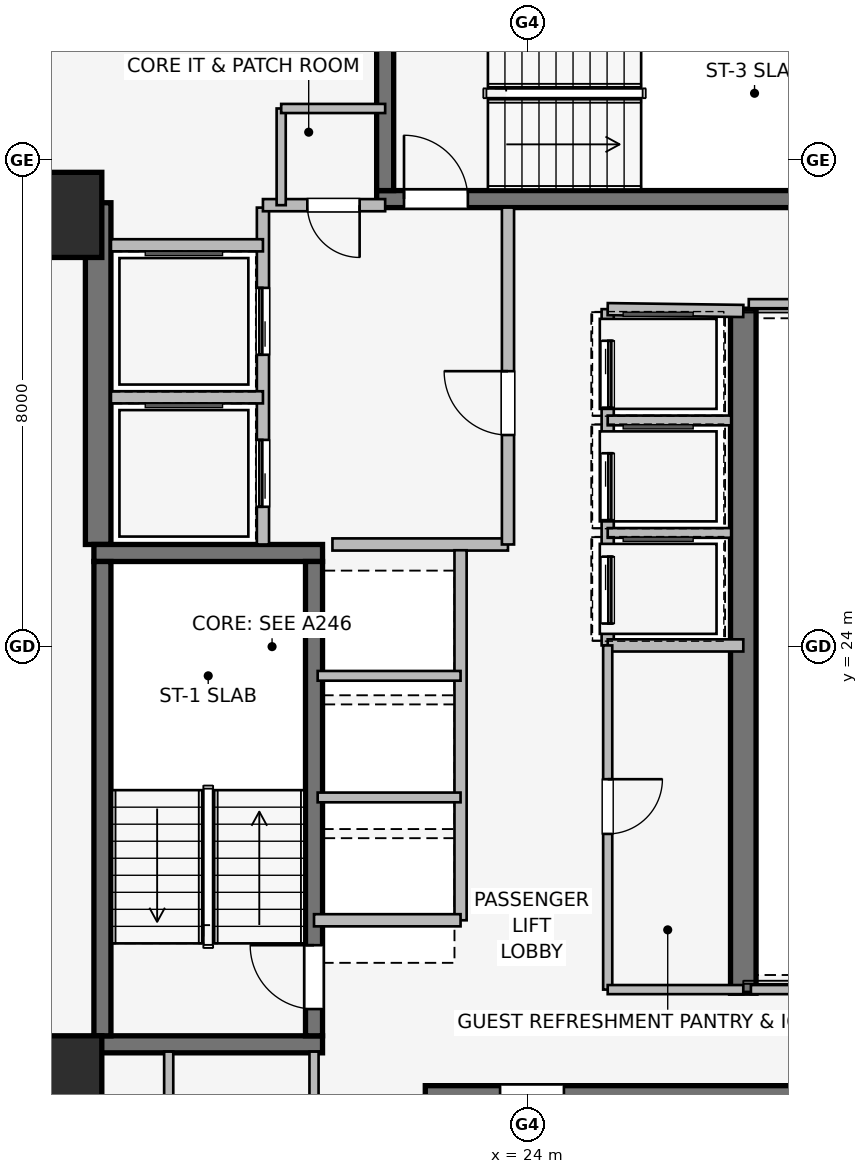
"""IFC4 building model, lengths in metres.
Left out: names, types, materials, properties, quantities, classifications, styles, units other than length and angle.
Written with IfcOpenShell. Run it as: python <this file> out.ifc"""

import sys

from ifc_helpers import new_model, si_unit, direction, frame, frame_2d, origin, origin_2d, place, context, subcontext, project, spatial, rectangle, extrude, element, fill, save


model = new_model("IFC4")
c1 = context("Model", 3, precision=1e-05, world=origin(), true_north=direction((0.0, 1.0)))
c2 = subcontext(c1, "Body", "Model", "MODEL_VIEW")
j1 = project(units=[si_unit("LENGTHUNIT", "METRE"), si_unit("PLANEANGLEUNIT", "RADIAN")], contexts=[c1])
p1 = place(None, origin())
s1 = spatial("IfcSite", under=j1, at=p1, CompositionType="ELEMENT")
p2 = place(p1, origin())
s2 = spatial("IfcBuilding", under=s1, at=p2, CompositionType="ELEMENT")
p3 = place(p2, frame((0.0, 0.0, 163.65)))
s3 = spatial("IfcBuildingStorey", under=s2, at=p3, CompositionType="ELEMENT", Elevation=163.65)
p4 = place(p3, frame((16.94, 25.68, 0.0), z_axis=(0.0, 0.0, 1.0), x_axis=(0.0, 1.0, 0.0)))
e1 = element("IfcWall", 1, at=p4, inside=s3, PredefinedType="SHEAR", context=c2, shape_type="SweptSolid", body=[
    extrude(rectangle(XDim=5.62, YDim=0.42, at=frame_2d((2.81, 0.0))), origin(), (0.0, 0.0, 1.0), 3.45),
])
p5 = place(p3, frame((27.55, 29.55, 0.0), z_axis=(0.0, 0.0, 1.0), x_axis=(0.0, -1.0, 0.0)))
e2 = element("IfcWall", 2, at=p5, inside=s3, PredefinedType="SHEAR", context=c2, shape_type="SweptSolid", body=[
    extrude(rectangle(XDim=11.25, YDim=0.42, at=frame_2d((5.625, 0.0))), origin(), (0.0, 0.0, 1.0), 3.45),
])
for number, where, z_axis, x_axis in (
    (3, (16.87, 17.46, 0.0), (0.0, 0.0, 1.0), (1.0, 0.0, 0.0)),
    (4, (20.63, 25.54, 0.0), (0.0, 0.0, 1.0), (-1.0, 0.0, 0.0)),
):
    element("IfcWall", number, at=place(p3, frame(where, z_axis=z_axis, x_axis=x_axis)), inside=s3, PredefinedType="SHEAR", context=c2, shape_type="SweptSolid", body=[
        extrude(rectangle(XDim=3.76, YDim=0.28, at=frame_2d((1.88, 0.0))), origin(), (0.0, 0.0, 1.0), 3.45),
    ])
p6 = place(p3, frame((17.01, 25.4, 0.0), z_axis=(0.0, 0.0, 1.0), x_axis=(0.0, -1.0, 0.0)))
e5 = element("IfcWall", 5, at=p6, inside=s3, PredefinedType="SHEAR", context=c2, shape_type="SweptSolid", body=[
    extrude(rectangle(XDim=7.8, YDim=0.28, at=frame_2d((3.9, 0.0))), origin(), (0.0, 0.0, 1.0), 3.45),
])
p7 = place(p3, frame((20.49, 17.6, 0.0), z_axis=(0.0, 0.0, 1.0), x_axis=(0.0, 1.0, 0.0)))
e6 = element("IfcWall", 6, at=p7, inside=s3, PredefinedType="SHEAR", context=c2, shape_type="SweptSolid", body=[
    extrude(rectangle(XDim=7.8, YDim=0.28, at=frame_2d((3.9, 0.0))), origin(), (0.0, 0.0, 1.0), 3.45),
])
p8 = place(p7, frame((0.44, 0.0, 0.0)))
e7 = element("IfcOpeningElement", 7, at=p8, cuts=e6, PredefinedType="OPENING", context=c2, shape_type="SweptSolid", body=[
    extrude(rectangle(XDim=1.05, YDim=2.0, at=frame_2d((0.525, 1.0))), frame((0.0, 0.15, 0.0), z_axis=(0.0, -1.0, 0.0), x_axis=(1.0, 0.0, 0.0)), (0.0, 0.0, 1.0), 0.3),
])
p9 = place(p3, frame((30.68, 16.64, 0.0), z_axis=(0.0, 0.0, 1.0), x_axis=(-1.0, 0.0, 0.0)))
e8 = element("IfcWall", 8, at=p9, inside=s3, PredefinedType="SHEAR", context=c2, shape_type="SweptSolid", body=[
    extrude(rectangle(XDim=8.36, YDim=0.28, at=frame_2d((4.18, 0.0))), origin(), (0.0, 0.0, 1.0), 3.45),
])
p10 = place(p9, frame((6.08, 0.0, 0.0)))
e9 = element("IfcOpeningElement", 9, at=p10, cuts=e8, PredefinedType="OPENING", context=c2, shape_type="SweptSolid", body=[
    extrude(rectangle(XDim=1.05, YDim=2.0, at=frame_2d((0.525, 1.0))), frame((0.0, 0.15, 0.0), z_axis=(0.0, -1.0, 0.0), x_axis=(1.0, 0.0, 0.0)), (0.0, 0.0, 1.0), 0.3),
])
p11 = place(p3, frame((21.52, 31.36, 0.0), z_axis=(0.0, 0.0, 1.0), x_axis=(1.0, 0.0, 0.0)))
e10 = element("IfcWall", 10, at=p11, inside=s3, PredefinedType="SHEAR", context=c2, shape_type="SweptSolid", body=[
    extrude(rectangle(XDim=8.36, YDim=0.28, at=frame_2d((4.18, 0.0))), origin(), (0.0, 0.0, 1.0), 3.45),
])
p12 = place(p11, frame((0.45, 0.0, 0.0)))
e11 = element("IfcOpeningElement", 11, at=p12, cuts=e10, PredefinedType="OPENING", context=c2, shape_type="SweptSolid", body=[
    extrude(rectangle(XDim=1.05, YDim=2.0, at=frame_2d((0.525, 1.0))), frame((0.0, 0.15, 0.0), z_axis=(0.0, -1.0, 0.0), x_axis=(1.0, 0.0, 0.0)), (0.0, 0.0, 1.0), 0.3),
])
p13 = place(p3, frame((21.66, 34.7, 0.0), z_axis=(0.0, 0.0, 1.0), x_axis=(0.0, -1.0, 0.0)))
e12 = element("IfcWall", 12, at=p13, inside=s3, PredefinedType="SHEAR", context=c2, shape_type="SweptSolid", body=[
    extrude(rectangle(XDim=3.2, YDim=0.28, at=frame_2d((1.6, 0.0))), origin(), (0.0, 0.0, 1.0), 3.45),
])
for number, where, z_axis, x_axis in (
    (13, (16.3, 16.9, 0.0), (0.0, 0.0, 1.0), (1.0, 0.0, 0.0)),
    (14, (16.3, 31.1, 0.0), (0.0, 0.0, 1.0), (1.0, 0.0, 0.0)),
):
    element("IfcColumn", number, at=place(p3, frame(where, z_axis=z_axis, x_axis=x_axis)), inside=s3, PredefinedType="COLUMN", context=c2, shape_type="SweptSolid", body=[
        extrude(rectangle(XDim=1.4, YDim=1.4, at=origin_2d()), origin(), (0.0, 0.0, 1.0), 3.45),
    ])
p14 = place(p3, frame((15.415, 32.882, 0.0), z_axis=(0.0, 0.0, 1.0), x_axis=(0.520325409202, 0.853968072318, 0.0)))
e15 = element("IfcWall", 15, at=p14, inside=s3, PredefinedType="STANDARD", context=c2, shape_type="SweptSolid", body=[
    extrude(rectangle(XDim=1.678, YDim=0.33, at=frame_2d((0.839, 0.0))), origin(), (0.0, 0.0, 1.0), 3.19),
])
p15 = place(p3, frame((19.65, 25.68, 0.0), z_axis=(0.0, 0.0, 1.0), x_axis=(0.0, 1.0, 0.0)))
e16 = element("IfcWall", 16, at=p15, inside=s3, PredefinedType="PARTITIONING", context=c2, shape_type="SweptSolid", body=[
    extrude(rectangle(XDim=5.54, YDim=0.2, at=frame_2d((2.77, 0.0))), origin(), (0.0, 0.0, 1.0), 3.19),
])
p16 = place(p15, frame((0.62, 0.0, 0.0)))
e17 = element("IfcOpeningElement", 17, at=p16, cuts=e16, PredefinedType="OPENING", context=c2, shape_type="SweptSolid", body=[
    extrude(rectangle(XDim=1.1, YDim=2.2, at=frame_2d((0.55, 1.1))), frame((0.0, 0.11, 0.0), z_axis=(0.0, -1.0, 0.0), x_axis=(1.0, 0.0, 0.0)), (0.0, 0.0, 1.0), 0.22),
])
p17 = place(p15, frame((3.12, 0.0, 0.0)))
e18 = element("IfcOpeningElement", 18, at=p17, cuts=e16, PredefinedType="OPENING", context=c2, shape_type="SweptSolid", body=[
    extrude(rectangle(XDim=1.1, YDim=2.2, at=frame_2d((0.55, 1.1))), frame((0.0, 0.11, 0.0), z_axis=(0.0, -1.0, 0.0), x_axis=(1.0, 0.0, 0.0)), (0.0, 0.0, 1.0), 0.22),
])
p18 = place(p3, frame((20.793, 25.68, 0.0), z_axis=(0.0, 0.0, 1.0), x_axis=(1.0, 0.0, 0.0)))
e19 = element("IfcWall", 19, at=p18, inside=s3, PredefinedType="PARTITIONING", context=c2, shape_type="SweptSolid", body=[
    extrude(rectangle(XDim=2.887, YDim=0.2, at=frame_2d((1.443, 0.0))), origin(), (0.0, 0.0, 1.0), 3.19),
])
p19 = place(p3, frame((23.68, 25.68, 0.0), z_axis=(0.0, 0.0, 1.0), x_axis=(0.0, 1.0, 0.0)))
e20 = element("IfcWall", 20, at=p19, inside=s3, PredefinedType="PARTITIONING", context=c2, shape_type="SweptSolid", body=[
    extrude(rectangle(XDim=5.54, YDim=0.2, at=frame_2d((2.77, 0.0))), origin(), (0.0, 0.0, 1.0), 3.19),
])
p20 = place(p19, frame((1.8, 0.0, 0.0)))
e21 = element("IfcOpeningElement", 21, at=p20, cuts=e20, PredefinedType="OPENING", context=c2, shape_type="SweptSolid", body=[
    extrude(rectangle(XDim=1.05, YDim=2.0, at=frame_2d((0.525, 1.0))), frame((0.0, 0.11, 0.0), z_axis=(0.0, -1.0, 0.0), x_axis=(1.0, 0.0, 0.0)), (0.0, 0.0, 1.0), 0.22),
])
p21 = place(p3, frame((21.66, 31.26, 0.0), z_axis=(0.0, 0.0, 1.0), x_axis=(-1.0, 0.0, 0.0)))
e22 = element("IfcWall", 22, at=p21, inside=s3, PredefinedType="PARTITIONING", context=c2, shape_type="SweptSolid", body=[
    extrude(rectangle(XDim=2.01, YDim=0.2, at=frame_2d((1.005, 0.0))), origin(), (0.0, 0.0, 1.0), 3.19),
])
p22 = place(p21, frame((0.42, 0.0, 0.0)))
e23 = element("IfcOpeningElement", 23, at=p22, cuts=e22, PredefinedType="OPENING", context=c2, shape_type="SweptSolid", body=[
    extrude(rectangle(XDim=0.86, YDim=2.0, at=frame_2d((0.43, 1.0))), frame((0.0, 0.11, 0.0), z_axis=(0.0, -1.0, 0.0), x_axis=(1.0, 0.0, 0.0)), (0.0, 0.0, 1.0), 0.22),
])
p23 = place(p3, frame((17.15, 28.1, 0.0), z_axis=(0.0, 0.0, 1.0), x_axis=(1.0, 0.0, 0.0)))
e24 = element("IfcWall", 24, at=p23, inside=s3, PredefinedType="PARTITIONING", context=c2, shape_type="SweptSolid", body=[
    extrude(rectangle(XDim=2.5, YDim=0.2, at=frame_2d((1.25, 0.0))), origin(), (0.0, 0.0, 1.0), 3.19),
])
p24 = place(p3, frame((19.65, 30.6, 0.0), z_axis=(0.0, 0.0, 1.0), x_axis=(-1.0, 0.0, 0.0)))
e25 = element("IfcWall", 25, at=p24, inside=s3, PredefinedType="PARTITIONING", context=c2, shape_type="SweptSolid", body=[
    extrude(rectangle(XDim=2.5, YDim=0.2, at=frame_2d((1.25, 0.0))), origin(), (0.0, 0.0, 1.0), 2.09),
])
p25 = place(p3, frame((22.9, 19.5, 0.0), z_axis=(0.0, 0.0, 1.0), x_axis=(0.0, 1.0, 0.0)))
e26 = element("IfcWall", 26, at=p25, inside=s3, PredefinedType="PARTITIONING", context=c2, shape_type="SweptSolid", body=[
    extrude(rectangle(XDim=6.085, YDim=0.2, at=frame_2d((3.042, 0.0))), origin(), (0.0, 0.0, 1.0), 3.19),
])
p26 = place(p3, frame((20.49, 19.5, 0.0), z_axis=(0.0, 0.0, 1.0), x_axis=(1.0, 0.0, 0.0)))
e27 = element("IfcWall", 27, at=p26, inside=s3, PredefinedType="PARTITIONING", context=c2, shape_type="SweptSolid", body=[
    extrude(rectangle(XDim=2.41, YDim=0.2, at=frame_2d((1.205, 0.0))), origin(), (0.0, 0.0, 1.0), 2.09),
])
for number, where, z_axis, x_axis in (
    (28, (20.55, 21.52, 0.0), (0.0, 0.0, 1.0), (1.0, 0.0, 0.0)),
    (29, (20.55, 23.52, 0.0), (0.0, 0.0, 1.0), (1.0, 0.0, 0.0)),
):
    element("IfcWall", number, at=place(p3, frame(where, z_axis=z_axis, x_axis=x_axis)), inside=s3, PredefinedType="PARTITIONING", context=c2, shape_type="SweptSolid", body=[
        extrude(rectangle(XDim=2.35, YDim=0.16, at=frame_2d((1.175, 0.0))), origin(), (0.0, 0.0, 1.0), 3.19),
    ])
p27 = place(p3, frame((25.32, 29.55, 0.0), z_axis=(0.0, 0.0, 1.0), x_axis=(0.0, -1.0, 0.0)))
e30 = element("IfcWall", 30, at=p27, inside=s3, PredefinedType="PARTITIONING", context=c2, shape_type="SweptSolid", body=[
    extrude(rectangle(XDim=5.53, YDim=0.2, at=frame_2d((2.765, 0.0))), origin(), (0.0, 0.0, 1.0), 3.19),
])
p28 = place(p27, frame((0.52, 0.0, 0.0)))
e31 = element("IfcOpeningElement", 31, at=p28, cuts=e30, PredefinedType="OPENING", context=c2, shape_type="SweptSolid", body=[
    extrude(rectangle(XDim=1.1, YDim=2.2, at=frame_2d((0.55, 1.1))), frame((0.0, 0.11, 0.0), z_axis=(0.0, -1.0, 0.0), x_axis=(1.0, 0.0, 0.0)), (0.0, 0.0, 1.0), 0.22),
])
p29 = place(p27, frame((2.37, 0.0, 0.0)))
e32 = element("IfcOpeningElement", 32, at=p29, cuts=e30, PredefinedType="OPENING", context=c2, shape_type="SweptSolid", body=[
    extrude(rectangle(XDim=1.1, YDim=2.2, at=frame_2d((0.55, 1.1))), frame((0.0, 0.11, 0.0), z_axis=(0.0, -1.0, 0.0), x_axis=(1.0, 0.0, 0.0)), (0.0, 0.0, 1.0), 0.22),
])
p30 = place(p27, frame((4.07, 0.0, 0.0)))
e33 = element("IfcOpeningElement", 33, at=p30, cuts=e30, PredefinedType="OPENING", context=c2, shape_type="SweptSolid", body=[
    extrude(rectangle(XDim=1.1, YDim=2.2, at=frame_2d((0.55, 1.1))), frame((0.0, 0.11, 0.0), z_axis=(0.0, -1.0, 0.0), x_axis=(1.0, 0.0, 0.0)), (0.0, 0.0, 1.0), 0.22),
])
p31 = place(p3, frame((27.55, 29.52, 0.0), z_axis=(0.0, 0.0, 1.0), x_axis=(-0.999909343457, 0.013464949556, 0.0)))
e34 = element("IfcWall", 34, at=p31, inside=s3, PredefinedType="PARTITIONING", context=c2, shape_type="SweptSolid", body=[
    extrude(rectangle(XDim=2.23, YDim=0.2, at=frame_2d((1.115, 0.0))), origin(), (0.0, 0.0, 1.0), 2.09),
])
p32 = place(p3, frame((25.32, 24.02, 0.0), z_axis=(0.0, 0.0, 1.0), x_axis=(1.0, 0.0, 0.0)))
e35 = element("IfcWall", 35, at=p32, inside=s3, PredefinedType="PARTITIONING", context=c2, shape_type="SweptSolid", body=[
    extrude(rectangle(XDim=2.23, YDim=0.2, at=frame_2d((1.115, 0.0))), origin(), (0.0, 0.0, 1.0), 3.19),
])
for number, where, z_axis, x_axis in (
    (36, (25.32, 25.87, 0.0), (0.0, 0.0, 1.0), (1.0, 0.0, 0.0)),
    (37, (25.32, 27.72, 0.0), (0.0, 0.0, 1.0), (1.0, 0.0, 0.0)),
):
    element("IfcWall", number, at=place(p3, frame(where, z_axis=z_axis, x_axis=x_axis)), inside=s3, PredefinedType="PARTITIONING", context=c2, shape_type="SweptSolid", body=[
        extrude(rectangle(XDim=2.03, YDim=0.16, at=frame_2d((1.015, 0.0))), origin(), (0.0, 0.0, 1.0), 3.19),
    ])
p33 = place(p3, frame((25.32, 24.02, 0.0), z_axis=(0.0, 0.0, 1.0), x_axis=(0.0, -1.0, 0.0)))
e38 = element("IfcWall", 38, at=p33, inside=s3, PredefinedType="PARTITIONING", context=c2, shape_type="SweptSolid", body=[
    extrude(rectangle(XDim=5.66, YDim=0.15, at=frame_2d((2.83, 0.0))), origin(), (0.0, 0.0, 1.0), 3.19),
])
p34 = place(p33, frame((2.2, 0.0, 0.0)))
e39 = element("IfcOpeningElement", 39, at=p34, cuts=e38, PredefinedType="OPENING", context=c2, shape_type="SweptSolid", body=[
    extrude(rectangle(XDim=0.9, YDim=2.0, at=frame_2d((0.45, 1.0))), frame((0.0, 0.085, 0.0), z_axis=(0.0, -1.0, 0.0), x_axis=(1.0, 0.0, 0.0)), (0.0, 0.0, 1.0), 0.17),
])
p35 = place(p3, frame((25.32, 18.36, 0.0), z_axis=(0.0, 0.0, 1.0), x_axis=(1.0, 0.0, 0.0)))
e40 = element("IfcWall", 40, at=p35, inside=s3, PredefinedType="PARTITIONING", context=c2, shape_type="SweptSolid", body=[
    extrude(rectangle(XDim=2.23, YDim=0.15, at=frame_2d((1.115, 0.0))), origin(), (0.0, 0.0, 1.0), 3.19),
])
p36 = place(p3, frame((18.1, 17.34, 0.0), z_axis=(0.0, 0.0, 1.0), x_axis=(0.0, -1.0, 0.0)))
e41 = element("IfcWall", 41, at=p36, inside=s3, PredefinedType="PARTITIONING", context=c2, shape_type="SweptSolid", body=[
    extrude(rectangle(XDim=3.66, YDim=0.15, at=frame_2d((1.83, 0.0))), origin(), (0.0, 0.0, 1.0), 3.19),
])
p37 = place(p3, frame((20.49, 13.68, 0.0), z_axis=(0.0, 0.0, 1.0), x_axis=(0.0, 1.0, 0.0)))
e42 = element("IfcWall", 42, at=p37, inside=s3, PredefinedType="PARTITIONING", context=c2, shape_type="SweptSolid", body=[
    extrude(rectangle(XDim=3.66, YDim=0.15, at=frame_2d((1.83, 0.0))), origin(), (0.0, 0.0, 1.0), 3.19),
])
p38 = place(p37, frame((1.25, 0.0, 0.0)))
e43 = element("IfcOpeningElement", 43, at=p38, cuts=e42, PredefinedType="OPENING", context=c2, shape_type="SweptSolid", body=[
    extrude(rectangle(XDim=0.9, YDim=2.0, at=frame_2d((0.45, 1.0))), frame((0.0, 0.085, 0.0), z_axis=(0.0, -1.0, 0.0), x_axis=(1.0, 0.0, 0.0)), (0.0, 0.0, 1.0), 0.17),
])
p39 = place(p3, frame((19.95, 32.85, 0.0), z_axis=(0.0, 0.0, 1.0), x_axis=(0.0, -1.0, 0.0)))
e44 = element("IfcWall", 44, at=p39, inside=s3, PredefinedType="PARTITIONING", context=c2, shape_type="SweptSolid", body=[
    extrude(rectangle(XDim=1.59, YDim=0.15, at=frame_2d((0.795, 0.0))), origin(), (0.0, 0.0, 1.0), 3.19),
])
p40 = place(p3, frame((21.66, 32.85, 0.0), z_axis=(0.0, 0.0, 1.0), x_axis=(-1.0, 0.0, 0.0)))
e45 = element("IfcWall", 45, at=p40, inside=s3, PredefinedType="PARTITIONING", context=c2, shape_type="SweptSolid", body=[
    extrude(rectangle(XDim=1.71, YDim=0.15, at=frame_2d((0.855, 0.0))), origin(), (0.0, 0.0, 1.0), 3.19),
])
p41 = place(p3, frame((27.675, 18.36, 0.0), z_axis=(0.0, 0.0, 1.0), x_axis=(1.0, 0.0, 0.0)))
e46 = element("IfcWall", 46, at=p41, inside=s3, PredefinedType="PARTITIONING", context=c2, shape_type="SweptSolid", body=[
    extrude(rectangle(XDim=12.165, YDim=0.15, at=frame_2d((6.083, 0.0))), origin(), (0.0, 0.0, 1.0), 2.331),
])
p42 = place(p3, frame((39.84, 29.64, 0.0), z_axis=(0.0, 0.0, 1.0), x_axis=(-1.0, 0.0, 0.0)))
e47 = element("IfcWall", 47, at=p42, inside=s3, PredefinedType="PARTITIONING", context=c2, shape_type="SweptSolid", body=[
    extrude(rectangle(XDim=12.2, YDim=0.15, at=frame_2d((6.1, 0.0))), origin(), (0.0, 0.0, 1.0), 2.331),
])
p43 = place(p8, origin())
e48 = element("IfcDoor", 48, at=p43, inside=s3, OperationType="SINGLE_SWING_RIGHT", PredefinedType="DOOR", context=c2, shape_type="SweptSolid", body=[
    extrude(rectangle(XDim=1.05, YDim=2.0, at=frame_2d((0.525, 1.0))), frame((0.0, 0.025, 0.0), z_axis=(0.0, -1.0, 0.0), x_axis=(1.0, 0.0, 0.0)), (0.0, 0.0, 1.0), 0.05),
])
fill(e7, e48)
p44 = place(p10, origin())
e49 = element("IfcDoor", 49, at=p44, inside=s3, OperationType="SINGLE_SWING_RIGHT", PredefinedType="DOOR", context=c2, shape_type="SweptSolid", body=[
    extrude(rectangle(XDim=1.05, YDim=2.0, at=frame_2d((0.525, 1.0))), frame((0.0, 0.025, 0.0), z_axis=(0.0, -1.0, 0.0), x_axis=(1.0, 0.0, 0.0)), (0.0, 0.0, 1.0), 0.05),
])
fill(e9, e49)
p45 = place(p12, origin())
e50 = element("IfcDoor", 50, at=p45, inside=s3, OperationType="SINGLE_SWING_LEFT", PredefinedType="DOOR", context=c2, shape_type="SweptSolid", body=[
    extrude(rectangle(XDim=1.05, YDim=2.0, at=frame_2d((0.525, 1.0))), frame((0.0, 0.025, 0.0), z_axis=(0.0, -1.0, 0.0), x_axis=(1.0, 0.0, 0.0)), (0.0, 0.0, 1.0), 0.05),
])
fill(e11, e50)
p46 = place(p16, origin())
e51 = element("IfcDoor", 51, at=p46, inside=s3, OperationType="SLIDING_TO_LEFT", PredefinedType="DOOR", context=c2, shape_type="SweptSolid", body=[
    extrude(rectangle(XDim=1.1, YDim=2.2, at=frame_2d((0.55, 1.1))), frame((0.0, 0.025, 0.0), z_axis=(0.0, -1.0, 0.0), x_axis=(1.0, 0.0, 0.0)), (0.0, 0.0, 1.0), 0.05),
])
fill(e17, e51)
p47 = place(p17, origin())
e52 = element("IfcDoor", 52, at=p47, inside=s3, OperationType="SLIDING_TO_LEFT", PredefinedType="DOOR", context=c2, shape_type="SweptSolid", body=[
    extrude(rectangle(XDim=1.1, YDim=2.2, at=frame_2d((0.55, 1.1))), frame((0.0, 0.025, 0.0), z_axis=(0.0, -1.0, 0.0), x_axis=(1.0, 0.0, 0.0)), (0.0, 0.0, 1.0), 0.05),
])
fill(e18, e52)
p48 = place(p20, origin())
e53 = element("IfcDoor", 53, at=p48, inside=s3, OperationType="SINGLE_SWING_RIGHT", PredefinedType="DOOR", context=c2, shape_type="SweptSolid", body=[
    extrude(rectangle(XDim=1.05, YDim=2.0, at=frame_2d((0.525, 1.0))), frame((0.0, 0.025, 0.0), z_axis=(0.0, -1.0, 0.0), x_axis=(1.0, 0.0, 0.0)), (0.0, 0.0, 1.0), 0.05),
])
fill(e21, e53)
p49 = place(p22, origin())
e54 = element("IfcDoor", 54, at=p49, inside=s3, OperationType="SINGLE_SWING_LEFT", PredefinedType="DOOR", context=c2, shape_type="SweptSolid", body=[
    extrude(rectangle(XDim=0.86, YDim=2.0, at=frame_2d((0.43, 1.0))), frame((0.0, 0.025, 0.0), z_axis=(0.0, -1.0, 0.0), x_axis=(1.0, 0.0, 0.0)), (0.0, 0.0, 1.0), 0.05),
])
fill(e23, e54)
p50 = place(p28, origin())
e55 = element("IfcDoor", 55, at=p50, inside=s3, OperationType="SLIDING_TO_LEFT", PredefinedType="DOOR", context=c2, shape_type="SweptSolid", body=[
    extrude(rectangle(XDim=1.1, YDim=2.2, at=frame_2d((0.55, 1.1))), frame((0.0, 0.025, 0.0), z_axis=(0.0, -1.0, 0.0), x_axis=(1.0, 0.0, 0.0)), (0.0, 0.0, 1.0), 0.05),
])
fill(e31, e55)
p51 = place(p29, origin())
e56 = element("IfcDoor", 56, at=p51, inside=s3, OperationType="SLIDING_TO_LEFT", PredefinedType="DOOR", context=c2, shape_type="SweptSolid", body=[
    extrude(rectangle(XDim=1.1, YDim=2.2, at=frame_2d((0.55, 1.1))), frame((0.0, 0.025, 0.0), z_axis=(0.0, -1.0, 0.0), x_axis=(1.0, 0.0, 0.0)), (0.0, 0.0, 1.0), 0.05),
])
fill(e32, e56)
p52 = place(p30, origin())
e57 = element("IfcDoor", 57, at=p52, inside=s3, OperationType="SLIDING_TO_LEFT", PredefinedType="DOOR", context=c2, shape_type="SweptSolid", body=[
    extrude(rectangle(XDim=1.1, YDim=2.2, at=frame_2d((0.55, 1.1))), frame((0.0, 0.025, 0.0), z_axis=(0.0, -1.0, 0.0), x_axis=(1.0, 0.0, 0.0)), (0.0, 0.0, 1.0), 0.05),
])
fill(e33, e57)
p53 = place(p34, origin())
e58 = element("IfcDoor", 58, at=p53, inside=s3, OperationType="SINGLE_SWING_LEFT", PredefinedType="DOOR", context=c2, shape_type="SweptSolid", body=[
    extrude(rectangle(XDim=0.9, YDim=2.0, at=frame_2d((0.45, 1.0))), frame((0.0, 0.025, 0.0), z_axis=(0.0, -1.0, 0.0), x_axis=(1.0, 0.0, 0.0)), (0.0, 0.0, 1.0), 0.05),
])
fill(e39, e58)
save(model, sys.argv[1])
